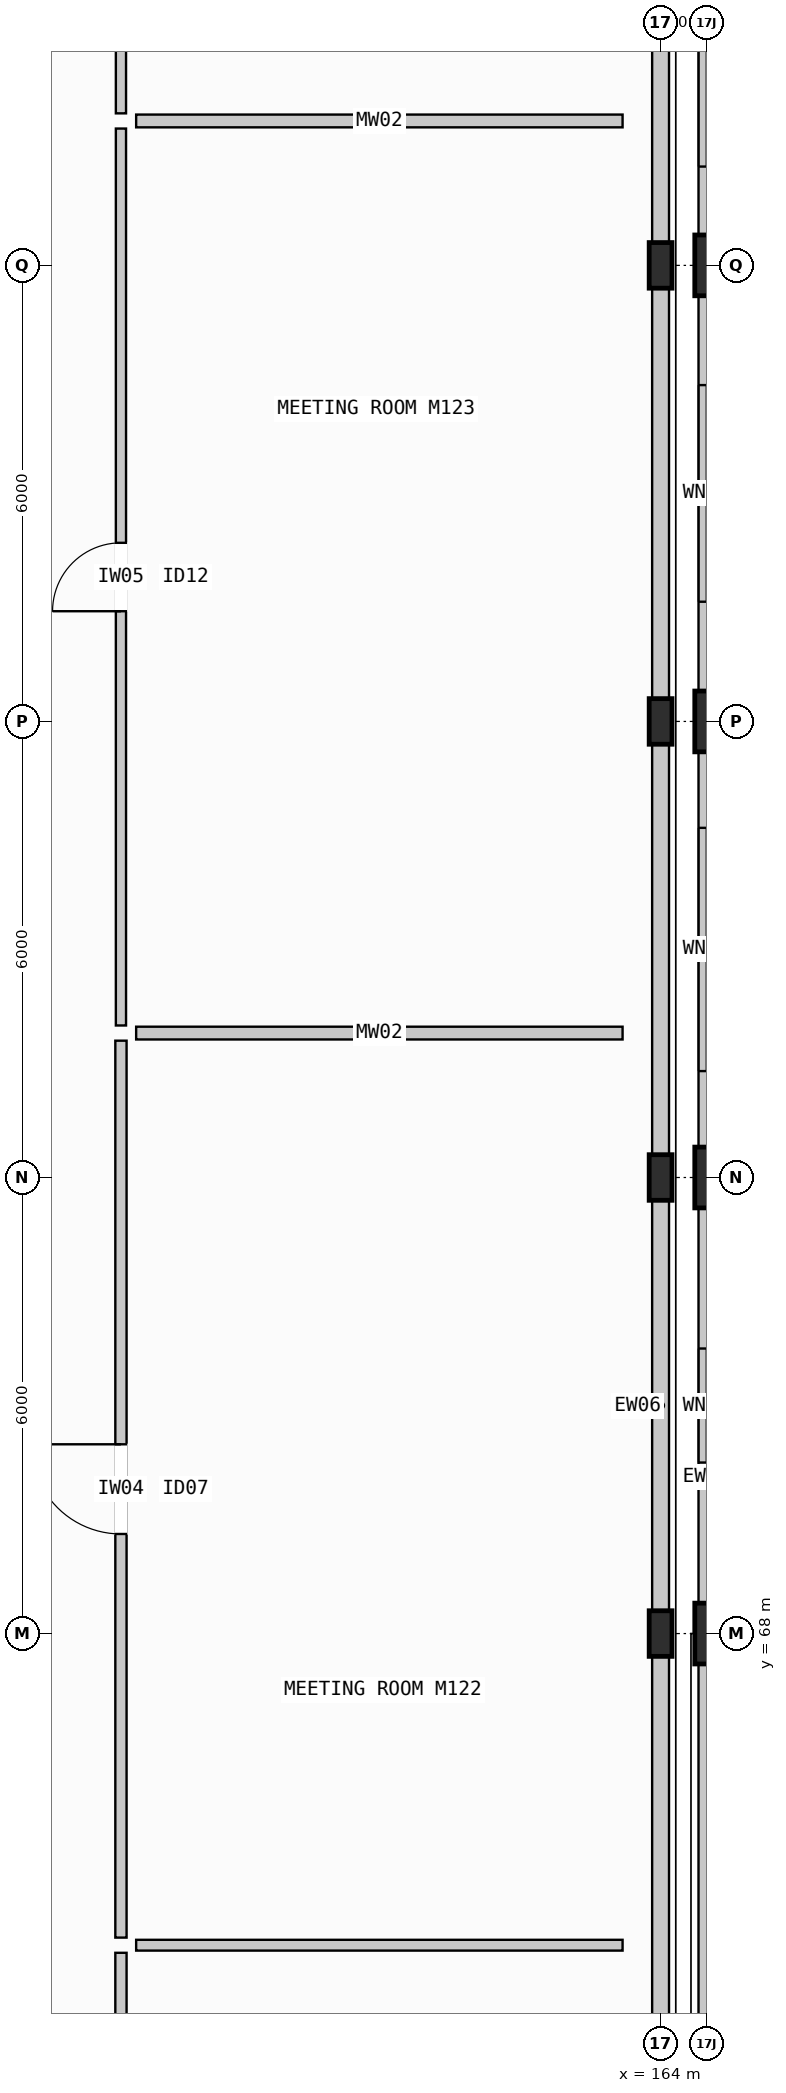
"""IFC4 building model, lengths in metres.
Left out: names, types, materials, properties, quantities, classifications, styles, units other than length and angle.
Written with IfcOpenShell. Run it as: python <this file> out.ifc"""

import sys

from ifc_helpers import new_model, si_unit, direction, frame, frame_2d, origin, origin_2d, place, context, subcontext, project, spatial, rectangle, i_section, extrude, element, fill, save


model = new_model("IFC4")
c1 = context("Model", 3, precision=1e-05, world=origin(), true_north=direction((0.0, 1.0)))
c2 = subcontext(c1, "Body", "Model", "MODEL_VIEW")
j1 = project(units=[si_unit("LENGTHUNIT", "METRE"), si_unit("PLANEANGLEUNIT", "RADIAN")], contexts=[c1])
p1 = place(None, origin())
s1 = spatial("IfcSite", under=j1, at=p1, CompositionType="ELEMENT")
p2 = place(p1, origin())
s2 = spatial("IfcBuilding", under=s1, at=p2, CompositionType="ELEMENT")
p3 = place(p2, frame((0.0, 0.0, 6.0)))
s3 = spatial("IfcBuildingStorey", under=s2, at=p3, CompositionType="ELEMENT", Elevation=6.0)
for number, where, z_axis, x_axis in (
    (1, (164.0, 68.0, 0.0), (0.0, 0.0, 1.0), (1.0, 0.0, 0.0)),
    (2, (164.0, 74.0, 0.0), (0.0, 0.0, 1.0), (1.0, 0.0, 0.0)),
    (3, (164.0, 80.0, 0.0), (0.0, 0.0, 1.0), (1.0, 0.0, 0.0)),
    (4, (164.0, 86.0, 0.0), (0.0, 0.0, 1.0), (1.0, 0.0, 0.0)),
):
    element("IfcColumn", number, at=place(p3, frame(where, z_axis=z_axis, x_axis=x_axis)), inside=s3, PredefinedType="COLUMN", context=c2, shape_type="SweptSolid", body=[
        extrude(i_section(OverallWidth=0.3, OverallDepth=0.6, WebThickness=0.015, FlangeThickness=0.03, FilletRadius=0.027, at=origin_2d()), origin(), (0.0, 0.0, 1.0), 5.4),
    ])
for number, where, z_axis, x_axis in (
    (5, (164.6, 68.0, 0.0), (0.0, 0.0, 1.0), (1.0, 0.0, 0.0)),
    (6, (164.6, 74.0, 0.0), (0.0, 0.0, 1.0), (1.0, 0.0, 0.0)),
    (7, (164.6, 80.0, 0.0), (0.0, 0.0, 1.0), (1.0, 0.0, 0.0)),
    (8, (164.6, 86.0, 0.0), (0.0, 0.0, 1.0), (1.0, 0.0, 0.0)),
):
    element("IfcColumn", number, at=place(p3, frame(where, z_axis=z_axis, x_axis=x_axis)), inside=s3, PredefinedType="COLUMN", context=c2, shape_type="SweptSolid", body=[
        extrude(i_section(OverallWidth=0.3, OverallDepth=0.8, WebThickness=0.018, FlangeThickness=0.033, FilletRadius=0.03, at=origin_2d()), origin(), (0.0, 0.0, 1.0), 5.4),
    ])
p4 = place(p3, frame((164.6, 62.396, 0.0), z_axis=(0.0, 0.0, 1.0), x_axis=(0.0, 1.0, 0.0)))
e9 = element("IfcWall", 9, at=p4, inside=s3, PredefinedType="STANDARD", context=c2, shape_type="SweptSolid", body=[
    extrude(rectangle(XDim=5.208, YDim=0.202, at=frame_2d((2.604, 0.0))), origin(), (0.0, 0.0, 1.0), 4.578),
])
p5 = place(p3, frame((164.6, 68.396, 0.0), z_axis=(0.0, 0.0, 1.0), x_axis=(0.0, 1.0, 0.0)))
e10 = element("IfcWall", 10, at=p5, inside=s3, PredefinedType="STANDARD", context=c2, shape_type="SweptSolid", body=[
    extrude(rectangle(XDim=5.208, YDim=0.202, at=frame_2d((2.604, 0.0))), origin(), (0.0, 0.0, 1.0), 4.6),
])
p6 = place(p5, frame((1.854, 0.0, 1.0)))
e11 = element("IfcOpeningElement", 11, at=p6, cuts=e10, PredefinedType="OPENING", context=c2, shape_type="SweptSolid", body=[
    extrude(rectangle(XDim=1.5, YDim=1.8, at=frame_2d((0.75, 0.9))), frame((0.0, 0.111, 0.0), z_axis=(0.0, -1.0, 0.0), x_axis=(1.0, 0.0, 0.0)), (0.0, 0.0, 1.0), 0.222),
])
p7 = place(p3, frame((164.6, 74.396, 0.0), z_axis=(0.0, 0.0, 1.0), x_axis=(0.0, 1.0, 0.0)))
e12 = element("IfcWall", 12, at=p7, inside=s3, PredefinedType="STANDARD", context=c2, shape_type="SweptSolid", body=[
    extrude(rectangle(XDim=5.208, YDim=0.202, at=frame_2d((2.604, 0.0))), origin(), (0.0, 0.0, 1.0), 4.6),
])
p8 = place(p7, frame((1.004, 0.0, 1.0)))
e13 = element("IfcOpeningElement", 13, at=p8, cuts=e12, PredefinedType="OPENING", context=c2, shape_type="SweptSolid", body=[
    extrude(rectangle(XDim=3.2, YDim=1.65, at=frame_2d((1.6, 0.825))), frame((0.0, 0.111, 0.0), z_axis=(0.0, -1.0, 0.0), x_axis=(1.0, 0.0, 0.0)), (0.0, 0.0, 1.0), 0.222),
])
p9 = place(p3, frame((164.6, 80.396, 0.0), z_axis=(0.0, 0.0, 1.0), x_axis=(0.0, 1.0, 0.0)))
e14 = element("IfcWall", 14, at=p9, inside=s3, PredefinedType="STANDARD", context=c2, shape_type="SweptSolid", body=[
    extrude(rectangle(XDim=5.208, YDim=0.202, at=frame_2d((2.604, 0.0))), origin(), (0.0, 0.0, 1.0), 4.6),
])
p10 = place(p9, frame((1.179, 0.0, 1.0)))
e15 = element("IfcOpeningElement", 15, at=p10, cuts=e14, PredefinedType="OPENING", context=c2, shape_type="SweptSolid", body=[
    extrude(rectangle(XDim=2.85, YDim=2.25, at=frame_2d((1.425, 1.125))), frame((0.0, 0.111, 0.0), z_axis=(0.0, -1.0, 0.0), x_axis=(1.0, 0.0, 0.0)), (0.0, 0.0, 1.0), 0.222),
])
p11 = place(p3, frame((164.6, 86.396, 0.0), z_axis=(0.0, 0.0, 1.0), x_axis=(0.0, 1.0, 0.0)))
e16 = element("IfcWall", 16, at=p11, inside=s3, PredefinedType="STANDARD", context=c2, shape_type="SweptSolid", body=[
    extrude(rectangle(XDim=5.208, YDim=0.202, at=frame_2d((2.604, 0.0))), origin(), (0.0, 0.0, 1.0), 4.6),
])
p12 = place(p11, frame((0.904, 0.0, 1.0)))
e17 = element("IfcOpeningElement", 17, at=p12, cuts=e16, PredefinedType="OPENING", context=c2, shape_type="SweptSolid", body=[
    extrude(rectangle(XDim=3.4, YDim=2.0, at=frame_2d((1.7, 1.0))), frame((0.0, 0.111, 0.0), z_axis=(0.0, -1.0, 0.0), x_axis=(1.0, 0.0, 0.0)), (0.0, 0.0, 1.0), 0.222),
])
for number, where, z_axis, x_axis in (
    (18, (164.0, 62.296, 0.0), (0.0, 0.0, 1.0), (0.0, 1.0, 0.0)),
    (19, (164.0, 68.296, 0.0), (0.0, 0.0, 1.0), (0.0, 1.0, 0.0)),
    (20, (164.0, 74.296, 0.0), (0.0, 0.0, 1.0), (0.0, 1.0, 0.0)),
    (21, (164.0, 80.296, 0.0), (0.0, 0.0, 1.0), (0.0, 1.0, 0.0)),
    (22, (164.0, 86.296, 0.0), (0.0, 0.0, 1.0), (0.0, 1.0, 0.0)),
):
    element("IfcWall", number, at=place(p3, frame(where, z_axis=z_axis, x_axis=x_axis)), inside=s3, PredefinedType="STANDARD", context=c2, shape_type="SweptSolid", body=[
        extrude(rectangle(XDim=5.408, YDim=0.222, at=frame_2d((2.704, 0.0))), origin(), (0.0, 0.0, 1.0), 4.518),
    ])
p13 = place(p3, frame((156.9, 52.0, 0.0), z_axis=(0.0, 0.0, 1.0), x_axis=(0.0, 1.0, 0.0)))
e23 = element("IfcWall", 23, at=p13, inside=s3, PredefinedType="PARTITIONING", context=c2, shape_type="SweptSolid", body=[
    extrude(rectangle(XDim=11.8, YDim=0.148, at=frame_2d((5.9, 0.0))), origin(), (0.0, 0.0, 1.0), 4.4),
])
p14 = place(p13, frame((5.34, 0.0, 0.0)))
e24 = element("IfcOpeningElement", 24, at=p14, cuts=e23, PredefinedType="OPENING", context=c2, shape_type="SweptSolid", body=[
    extrude(rectangle(XDim=1.12, YDim=2.22, at=frame_2d((0.56, 1.11))), frame((0.0, 0.084, 0.0), z_axis=(0.0, -1.0, 0.0), x_axis=(1.0, 0.0, 0.0)), (0.0, 0.0, 1.0), 0.168),
])
p15 = place(p3, frame((156.9, 64.0, 0.0), z_axis=(0.0, 0.0, 1.0), x_axis=(0.0, 1.0, 0.0)))
e25 = element("IfcWall", 25, at=p15, inside=s3, PredefinedType="PARTITIONING", context=c2, shape_type="SweptSolid", body=[
    extrude(rectangle(XDim=11.8, YDim=0.148, at=frame_2d((5.9, 0.0))), origin(), (0.0, 0.0, 1.0), 4.4),
])
p16 = place(p15, frame((5.31, 0.0, 0.0)))
e26 = element("IfcOpeningElement", 26, at=p16, cuts=e25, PredefinedType="OPENING", context=c2, shape_type="SweptSolid", body=[
    extrude(rectangle(XDim=1.18, YDim=2.25, at=frame_2d((0.59, 1.125))), frame((0.0, 0.084, 0.0), z_axis=(0.0, -1.0, 0.0), x_axis=(1.0, 0.0, 0.0)), (0.0, 0.0, 1.0), 0.168),
])
p17 = place(p3, frame((156.9, 76.0, 0.0), z_axis=(0.0, 0.0, 1.0), x_axis=(0.0, 1.0, 0.0)))
e27 = element("IfcWall", 27, at=p17, inside=s3, PredefinedType="PARTITIONING", context=c2, shape_type="SweptSolid", body=[
    extrude(rectangle(XDim=11.8, YDim=0.134, at=frame_2d((5.9, 0.0))), origin(), (0.0, 0.0, 1.0), 4.4),
])
p18 = place(p17, frame((5.45, 0.0, 0.0)))
e28 = element("IfcOpeningElement", 28, at=p18, cuts=e27, PredefinedType="OPENING", context=c2, shape_type="SweptSolid", body=[
    extrude(rectangle(XDim=0.9, YDim=2.08, at=frame_2d((0.45, 1.04))), frame((0.0, 0.077, 0.0), z_axis=(0.0, -1.0, 0.0), x_axis=(1.0, 0.0, 0.0)), (0.0, 0.0, 1.0), 0.154),
])
p19 = place(p3, frame((156.9, 88.0, 0.0), z_axis=(0.0, 0.0, 1.0), x_axis=(0.0, 1.0, 0.0)))
e29 = element("IfcWall", 29, at=p19, inside=s3, PredefinedType="PARTITIONING", context=c2, shape_type="SweptSolid", body=[
    extrude(rectangle(XDim=11.8, YDim=0.134, at=frame_2d((5.9, 0.0))), origin(), (0.0, 0.0, 1.0), 4.4),
])
p20 = place(p19, frame((5.41, 0.0, 0.0)))
e30 = element("IfcOpeningElement", 30, at=p20, cuts=e29, PredefinedType="OPENING", context=c2, shape_type="SweptSolid", body=[
    extrude(rectangle(XDim=0.98, YDim=2.14, at=frame_2d((0.49, 1.07))), frame((0.0, 0.077, 0.0), z_axis=(0.0, -1.0, 0.0), x_axis=(1.0, 0.0, 0.0)), (0.0, 0.0, 1.0), 0.154),
])
p21 = place(p3, frame((157.1, 63.9, 0.0), z_axis=(0.0, 0.0, 1.0), x_axis=(1.0, 0.0, 0.0)))
e31 = element("IfcWall", 31, at=p21, inside=s3, PredefinedType="MOVABLE", context=c2, shape_type="SweptSolid", body=[
    extrude(rectangle(XDim=6.4, YDim=0.142, at=frame_2d((3.2, 0.0))), origin(), (0.0, 0.0, 1.0), 4.4),
])
for number, where, z_axis, x_axis in (
    (32, (157.1, 75.9, 0.0), (0.0, 0.0, 1.0), (1.0, 0.0, 0.0)),
    (33, (157.1, 87.9, 0.0), (0.0, 0.0, 1.0), (1.0, 0.0, 0.0)),
):
    element("IfcWall", number, at=place(p3, frame(where, z_axis=z_axis, x_axis=x_axis)), inside=s3, PredefinedType="MOVABLE", context=c2, shape_type="SweptSolid", body=[
        extrude(rectangle(XDim=6.4, YDim=0.168, at=frame_2d((3.2, 0.0))), origin(), (0.0, 0.0, 1.0), 4.4),
    ])
p22 = place(p6, origin())
e34 = element("IfcWindow", 34, at=p22, inside=s3, PartitioningType="SINGLE_PANEL", PredefinedType="WINDOW", context=c2, shape_type="SweptSolid", body=[
    extrude(rectangle(XDim=1.5, YDim=1.8, at=frame_2d((0.75, 0.9))), frame((0.0, 0.03, 0.0), z_axis=(0.0, -1.0, 0.0), x_axis=(1.0, 0.0, 0.0)), (0.0, 0.0, 1.0), 0.06),
])
fill(e11, e34)
p23 = place(p8, origin())
e35 = element("IfcWindow", 35, at=p23, inside=s3, PartitioningType="SINGLE_PANEL", PredefinedType="WINDOW", context=c2, shape_type="SweptSolid", body=[
    extrude(rectangle(XDim=3.2, YDim=1.65, at=frame_2d((1.6, 0.825))), frame((0.0, 0.03, 0.0), z_axis=(0.0, -1.0, 0.0), x_axis=(1.0, 0.0, 0.0)), (0.0, 0.0, 1.0), 0.06),
])
fill(e13, e35)
p24 = place(p10, origin())
e36 = element("IfcWindow", 36, at=p24, inside=s3, PartitioningType="SINGLE_PANEL", PredefinedType="WINDOW", context=c2, shape_type="SweptSolid", body=[
    extrude(rectangle(XDim=2.85, YDim=2.25, at=frame_2d((1.425, 1.125))), frame((0.0, 0.03, 0.0), z_axis=(0.0, -1.0, 0.0), x_axis=(1.0, 0.0, 0.0)), (0.0, 0.0, 1.0), 0.06),
])
fill(e15, e36)
p25 = place(p12, origin())
e37 = element("IfcWindow", 37, at=p25, inside=s3, PartitioningType="SINGLE_PANEL", PredefinedType="WINDOW", context=c2, shape_type="SweptSolid", body=[
    extrude(rectangle(XDim=3.4, YDim=2.0, at=frame_2d((1.7, 1.0))), frame((0.0, 0.03, 0.0), z_axis=(0.0, -1.0, 0.0), x_axis=(1.0, 0.0, 0.0)), (0.0, 0.0, 1.0), 0.06),
])
fill(e17, e37)
p26 = place(p16, origin())
e38 = element("IfcDoor", 38, at=p26, inside=s3, OperationType="SINGLE_SWING_RIGHT", PredefinedType="DOOR", context=c2, shape_type="SweptSolid", body=[
    extrude(rectangle(XDim=1.18, YDim=2.25, at=frame_2d((0.59, 1.125))), frame((0.0, 0.025, 0.0), z_axis=(0.0, -1.0, 0.0), x_axis=(1.0, 0.0, 0.0)), (0.0, 0.0, 1.0), 0.05),
])
fill(e26, e38)
p27 = place(p18, origin())
e39 = element("IfcDoor", 39, at=p27, inside=s3, OperationType="SINGLE_SWING_LEFT", PredefinedType="DOOR", context=c2, shape_type="SweptSolid", body=[
    extrude(rectangle(XDim=0.9, YDim=2.08, at=frame_2d((0.45, 1.04))), frame((0.0, 0.025, 0.0), z_axis=(0.0, -1.0, 0.0), x_axis=(1.0, 0.0, 0.0)), (0.0, 0.0, 1.0), 0.05),
])
fill(e28, e39)
save(model, sys.argv[1])
